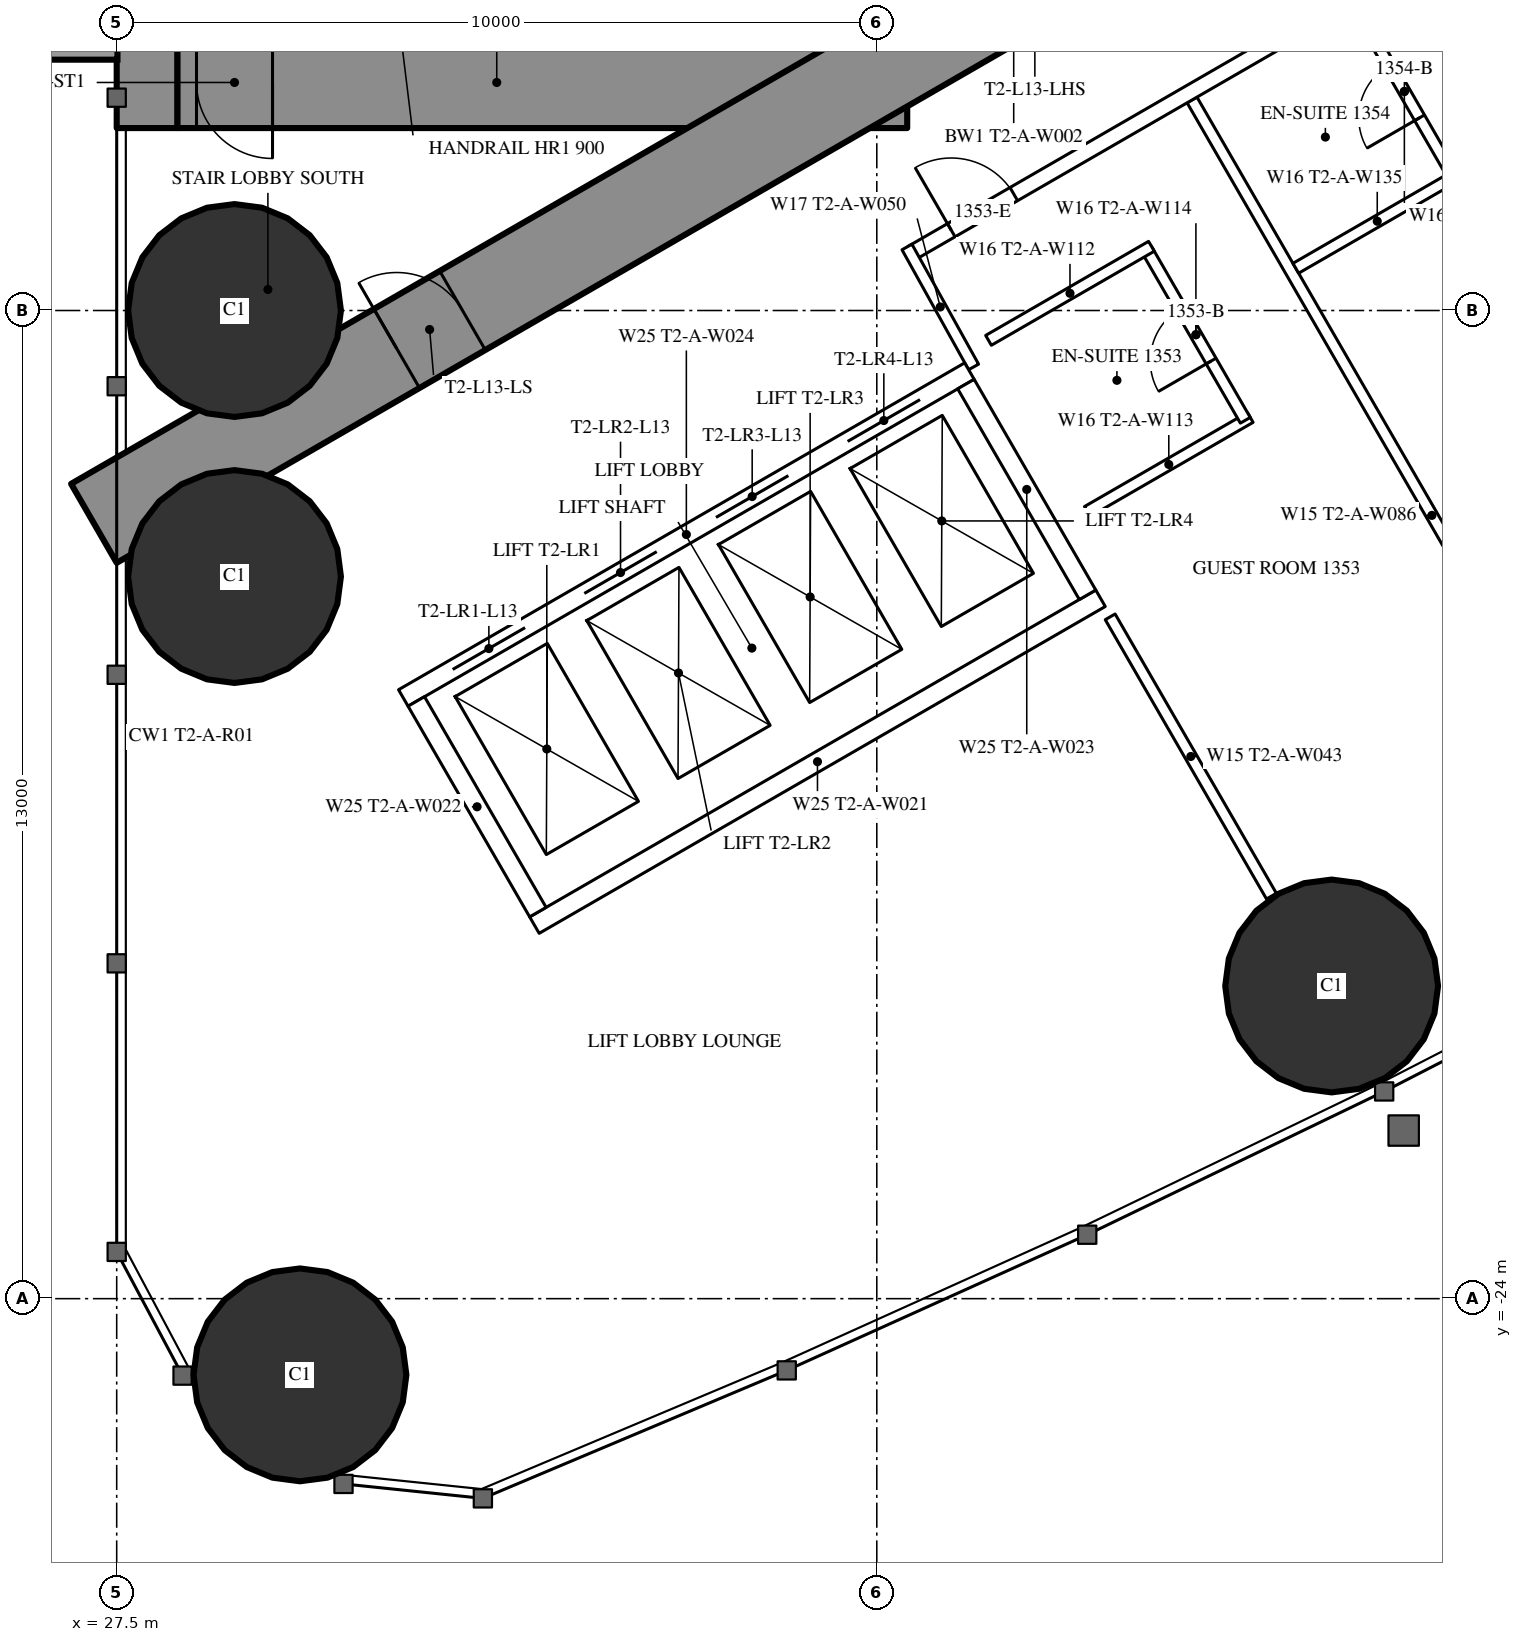
"""IFC4 building model, lengths in metres.
Left out: names, types, materials, properties, quantities, classifications, styles, units other than length and angle.
Written with IfcOpenShell. Run it as: python <this file> out.ifc"""

import sys

from ifc_helpers import new_model, si_unit, direction, frame, frame_2d, origin, origin_2d, place, context, subcontext, project, spatial, rectangle, hollow_circle, extrude, element, fill, save


model = new_model("IFC4")
c1 = context("Model", 3, precision=1e-05, world=origin(), true_north=direction((0.0, 1.0)))
c2 = subcontext(c1, "Body", "Model", "MODEL_VIEW")
j1 = project(units=[si_unit("LENGTHUNIT", "METRE"), si_unit("PLANEANGLEUNIT", "RADIAN")], contexts=[c1])
p1 = place(None, origin())
s1 = spatial("IfcSite", under=j1, at=p1, CompositionType="ELEMENT")
p2 = place(p1, origin())
s2 = spatial("IfcBuilding", under=s1, at=p2, CompositionType="ELEMENT")
p3 = place(p2, frame((0.0, 0.0, 53.0)))
s3 = spatial("IfcBuildingStorey", under=s2, at=p3, CompositionType="ELEMENT", Elevation=53.0)
for number, where, z_axis, x_axis in (
    (1, (29.911, -25.002, 0.0), (0.0, 0.0, 1.0), (1.0, 0.0, 0.0)),
    (2, (29.05, -11.0, 0.0), (0.0, 0.0, 1.0), (1.0, 0.0, 0.0)),
    (3, (29.05, -14.5, 0.0), (0.0, 0.0, 1.0), (1.0, 0.0, 0.0)),
    (4, (43.484, -19.886, 0.0), (0.0, 0.0, 1.0), (1.0, 0.0, 0.0)),
):
    element("IfcColumn", number, at=place(p3, frame(where, z_axis=z_axis, x_axis=x_axis)), inside=s3, PredefinedType="COLUMN", context=c2, shape_type="SweptSolid", body=[
        extrude(hollow_circle(Radius=1.4, WallThickness=0.12, at=origin_2d()), origin(), (0.0, 0.0, 1.0), 3.5),
    ])
p4 = place(p3, frame((27.9, -8.6, 0.0), z_axis=(0.0, 0.0, 1.0), x_axis=(0.0, 1.0, 0.0)))
e5 = element("IfcWall", 5, at=p4, inside=s3, PredefinedType="SHEAR", context=c2, shape_type="SweptSolid", body=[
    extrude(rectangle(XDim=17.2, YDim=0.8, at=frame_2d((8.6, 0.0))), origin(), (0.0, 0.0, 1.0), 3.5),
])
p5 = place(p4, frame((2.45, 0.0, 0.6)))
e6 = element("IfcOpeningElement", 6, at=p5, cuts=e5, PredefinedType="OPENING", context=c2, shape_type="SweptSolid", body=[
    extrude(rectangle(XDim=0.6, YDim=2.1, at=frame_2d((0.3, 1.05))), frame((0.0, 0.41, 0.0), z_axis=(0.0, -1.0, 0.0), x_axis=(1.0, 0.0, 0.0)), (0.0, 0.0, 1.0), 0.82),
])
p6 = place(p4, frame((14.15, 0.0, 0.6)))
e7 = element("IfcOpeningElement", 7, at=p6, cuts=e5, PredefinedType="OPENING", context=c2, shape_type="SweptSolid", body=[
    extrude(rectangle(XDim=0.6, YDim=2.1, at=frame_2d((0.3, 1.05))), frame((0.0, 0.41, 0.0), z_axis=(0.0, -1.0, 0.0), x_axis=(1.0, 0.0, 0.0)), (0.0, 0.0, 1.0), 0.82),
])
p7 = place(p3, frame((37.3, -8.6, 0.0), z_axis=(0.0, 0.0, 1.0), x_axis=(0.0, 1.0, 0.0)))
e8 = element("IfcWall", 8, at=p7, inside=s3, PredefinedType="SHEAR", context=c2, shape_type="SweptSolid", body=[
    extrude(rectangle(XDim=17.2, YDim=1.2, at=frame_2d((8.6, 0.0))), origin(), (0.0, 0.0, 1.0), 3.5),
])
p8 = place(p7, frame((7.7, 0.0, 0.0)))
e9 = element("IfcOpeningElement", 9, at=p8, cuts=e8, PredefinedType="OPENING", context=c2, shape_type="SweptSolid", body=[
    extrude(rectangle(XDim=1.8, YDim=2.2, at=frame_2d((0.9, 1.1))), frame((0.0, 0.61, 0.0), z_axis=(0.0, -1.0, 0.0), x_axis=(1.0, 0.0, 0.0)), (0.0, 0.0, 1.0), 1.22),
])
p9 = place(p3, frame((28.3, -8.0, 0.0), z_axis=(0.0, 0.0, 1.0), x_axis=(1.0, 0.0, 0.0)))
e10 = element("IfcWall", 10, at=p9, inside=s3, PredefinedType="SHEAR", context=c2, shape_type="SweptSolid", body=[
    extrude(rectangle(XDim=8.4, YDim=1.2, at=frame_2d((4.2, 0.0))), origin(), (0.0, 0.0, 1.0), 3.5),
])
p10 = place(p9, frame((0.25, 0.0, 0.0)))
e11 = element("IfcOpeningElement", 11, at=p10, cuts=e10, PredefinedType="OPENING", context=c2, shape_type="SweptSolid", body=[
    extrude(rectangle(XDim=1.0, YDim=2.2, at=frame_2d((0.5, 1.1))), frame((0.0, 0.61, 0.0), z_axis=(0.0, -1.0, 0.0), x_axis=(1.0, 0.0, 0.0)), (0.0, 0.0, 1.0), 1.22),
])
p11 = place(p3, frame((27.2, -13.8, 0.0), z_axis=(0.0, 0.0, 1.0), x_axis=(0.866027159892, 0.499996958321, 0.0)))
e12 = element("IfcWall", 12, at=p11, inside=s3, PredefinedType="SHEAR", context=c2, shape_type="SweptSolid", body=[
    extrude(rectangle(XDim=27.947, YDim=1.2, at=frame_2d((13.973, 0.0))), origin(), (0.0, 0.0, 1.0), 3.5),
])
p12 = place(p11, frame((4.6, 0.0, 0.0)))
e13 = element("IfcOpeningElement", 13, at=p12, cuts=e12, PredefinedType="OPENING", context=c2, shape_type="SweptSolid", body=[
    extrude(rectangle(XDim=1.0, YDim=2.2, at=frame_2d((0.5, 1.1))), frame((0.0, 0.61, 0.0), z_axis=(0.0, -1.0, 0.0), x_axis=(1.0, 0.0, 0.0)), (0.0, 0.0, 1.0), 1.22),
])
p13 = place(p11, frame((13.395, 0.0, 0.0)))
e14 = element("IfcOpeningElement", 14, at=p13, cuts=e12, PredefinedType="OPENING", context=c2, shape_type="SweptSolid", body=[
    extrude(rectangle(XDim=1.8, YDim=2.2, at=frame_2d((0.9, 1.1))), frame((0.0, 0.61, 0.0), z_axis=(0.0, -1.0, 0.0), x_axis=(1.0, 0.0, 0.0)), (0.0, 0.0, 1.0), 1.22),
])
p14 = place(p3, frame((41.647, -8.23, 0.0), z_axis=(0.0, 0.0, 1.0), x_axis=(0.49998590462, -0.866033541603, 0.0)))
e15 = element("IfcWall", 15, at=p14, inside=s3, PredefinedType="PARTITIONING", context=c2, shape_type="SweptSolid", body=[
    extrude(rectangle(XDim=12.621, YDim=0.15, at=frame_2d((6.311, 0.0))), origin(), (0.0, 0.0, 1.0), 3.25),
])
p15 = place(p3, frame((40.57, -15.03, 0.0), z_axis=(0.0, 0.0, 1.0), x_axis=(0.500012993597, -0.866017901798, 0.0)))
e16 = element("IfcWall", 16, at=p15, inside=s3, PredefinedType="PARTITIONING", context=c2, shape_type="SweptSolid", body=[
    extrude(rectangle(XDim=4.243, YDim=0.15, at=frame_2d((2.122, 0.0))), origin(), (0.0, 0.0, 1.0), 3.25),
])
p16 = place(p3, frame((37.96, -10.243, 0.0), z_axis=(0.0, 0.0, 1.0), x_axis=(0.866026429433, 0.499998223521, 0.0)))
e17 = element("IfcWall", 17, at=p16, inside=s3, PredefinedType="PARTITIONING", context=c2, shape_type="SweptSolid", body=[
    extrude(rectangle(XDim=20.487, YDim=0.2, at=frame_2d((10.243, 0.0))), origin(), (0.0, 0.0, 1.0), 3.25),
])
p17 = place(p16, frame((6.925, 0.0, 0.0)))
e18 = element("IfcOpeningElement", 18, at=p17, cuts=e17, PredefinedType="OPENING", context=c2, shape_type="SweptSolid", body=[
    extrude(rectangle(XDim=0.95, YDim=2.2, at=frame_2d((0.475, 1.1))), frame((0.0, 0.11, 0.0), z_axis=(0.0, -1.0, 0.0), x_axis=(1.0, 0.0, 0.0)), (0.0, 0.0, 1.0), 0.22),
])
p18 = place(p16, frame((11.549, 0.0, 0.0)))
e19 = element("IfcOpeningElement", 19, at=p18, cuts=e17, PredefinedType="OPENING", context=c2, shape_type="SweptSolid", body=[
    extrude(rectangle(XDim=0.95, YDim=2.2, at=frame_2d((0.475, 1.1))), frame((0.0, 0.11, 0.0), z_axis=(0.0, -1.0, 0.0), x_axis=(1.0, 0.0, 0.0)), (0.0, 0.0, 1.0), 0.22),
])
p19 = place(p16, frame((13.249, 0.0, 0.0)))
e20 = element("IfcOpeningElement", 20, at=p19, cuts=e17, PredefinedType="OPENING", context=c2, shape_type="SweptSolid", body=[
    extrude(rectangle(XDim=0.95, YDim=2.2, at=frame_2d((0.475, 1.1))), frame((0.0, 0.11, 0.0), z_axis=(0.0, -1.0, 0.0), x_axis=(1.0, 0.0, 0.0)), (0.0, 0.0, 1.0), 0.22),
])
p20 = place(p16, frame((17.585, 0.0, 0.0)))
e21 = element("IfcOpeningElement", 21, at=p20, cuts=e17, PredefinedType="OPENING", context=c2, shape_type="SweptSolid", body=[
    extrude(rectangle(XDim=0.95, YDim=2.2, at=frame_2d((0.475, 1.1))), frame((0.0, 0.11, 0.0), z_axis=(0.0, -1.0, 0.0), x_axis=(1.0, 0.0, 0.0)), (0.0, 0.0, 1.0), 0.22),
])
p21 = place(p16, frame((0.6, 0.0, 0.0)))
e22 = element("IfcOpeningElement", 22, at=p21, cuts=e17, PredefinedType="OPENING", context=c2, shape_type="SweptSolid", body=[
    extrude(rectangle(XDim=0.95, YDim=2.2, at=frame_2d((0.475, 1.1))), frame((0.0, 0.11, 0.0), z_axis=(0.0, -1.0, 0.0), x_axis=(1.0, 0.0, 0.0)), (0.0, 0.0, 1.0), 0.22),
])
p22 = place(p3, frame((38.773, -11.742, 0.0), z_axis=(0.0, 0.0, 1.0), x_axis=(-0.485528096672, 0.8742210632, 0.0)))
e23 = element("IfcWall", 23, at=p22, inside=s3, PredefinedType="PARTITIONING", context=c2, shape_type="SweptSolid", body=[
    extrude(rectangle(XDim=1.805, YDim=0.15, at=frame_2d((0.903, 0.0))), origin(), (0.0, 0.0, 1.0), 3.25),
])
p23 = place(p3, frame((43.012, -10.444, 0.0), z_axis=(0.0, 0.0, 1.0), x_axis=(0.866031185235, 0.4999899861, 0.0)))
e24 = element("IfcWall", 24, at=p23, inside=s3, PredefinedType="PARTITIONING", context=c2, shape_type="SweptSolid", body=[
    extrude(rectangle(XDim=2.475, YDim=0.15, at=frame_2d((1.238, 0.0))), origin(), (0.0, 0.0, 1.0), 3.25),
])
p24 = place(p3, frame((43.791, -6.993, 0.0), z_axis=(0.0, 0.0, 1.0), x_axis=(0.500047596559, -0.865997922154, 0.0)))
e25 = element("IfcWall", 25, at=p24, inside=s3, PredefinedType="PARTITIONING", context=c2, shape_type="SweptSolid", body=[
    extrude(rectangle(XDim=2.6, YDim=0.15, at=frame_2d((1.3, 0.0))), origin(), (0.0, 0.0, 1.0), 3.25),
])
p25 = place(p24, frame((0.9, 0.0, 0.0)))
e26 = element("IfcOpeningElement", 26, at=p25, cuts=e25, PredefinedType="OPENING", context=c2, shape_type="SweptSolid", body=[
    extrude(rectangle(XDim=0.8, YDim=2.2, at=frame_2d((0.4, 1.1))), frame((0.0, 0.085, 0.0), z_axis=(0.0, -1.0, 0.0), x_axis=(1.0, 0.0, 0.0)), (0.0, 0.0, 1.0), 0.17),
])
p26 = place(p3, frame((40.27, -13.644, 0.0), z_axis=(0.0, 0.0, 1.0), x_axis=(0.866031185235, 0.4999899861, 0.0)))
e27 = element("IfcWall", 27, at=p26, inside=s3, PredefinedType="PARTITIONING", context=c2, shape_type="SweptSolid", body=[
    extrude(rectangle(XDim=2.475, YDim=0.15, at=frame_2d((1.238, 0.0))), origin(), (0.0, 0.0, 1.0), 3.25),
])
p27 = place(p3, frame((41.048, -10.193, 0.0), z_axis=(0.0, 0.0, 1.0), x_axis=(0.500047596559, -0.865997922154, 0.0)))
e28 = element("IfcWall", 28, at=p27, inside=s3, PredefinedType="PARTITIONING", context=c2, shape_type="SweptSolid", body=[
    extrude(rectangle(XDim=2.6, YDim=0.15, at=frame_2d((1.3, 0.0))), origin(), (0.0, 0.0, 1.0), 3.25),
])
p28 = place(p27, frame((0.9, 0.0, 0.0)))
e29 = element("IfcOpeningElement", 29, at=p28, cuts=e28, PredefinedType="OPENING", context=c2, shape_type="SweptSolid", body=[
    extrude(rectangle(XDim=0.8, YDim=2.2, at=frame_2d((0.4, 1.1))), frame((0.0, 0.085, 0.0), z_axis=(0.0, -1.0, 0.0), x_axis=(1.0, 0.0, 0.0)), (0.0, 0.0, 1.0), 0.17),
])
p29 = place(p3, frame((38.97, -11.393, 0.0), z_axis=(0.0, 0.0, 1.0), x_axis=(0.866031185235, 0.4999899861, 0.0)))
e30 = element("IfcWall", 30, at=p29, inside=s3, PredefinedType="PARTITIONING", context=c2, shape_type="SweptSolid", body=[
    extrude(rectangle(XDim=2.475, YDim=0.15, at=frame_2d((1.238, 0.0))), origin(), (0.0, 0.0, 1.0), 3.25),
])
p30 = place(p3, frame((31.271, -16.097, 0.0), z_axis=(0.0, 0.0, 1.0), x_axis=(0.86604045752, 0.499973925258, 0.0)))
e31 = element("IfcWall", 31, at=p30, inside=s3, PredefinedType="PARTITIONING", context=c2, shape_type="SweptSolid", body=[
    extrude(rectangle(XDim=8.6, YDim=0.25, at=frame_2d((4.3, 0.0))), origin(), (0.0, 0.0, 1.0), 3.25),
])
p31 = place(p30, frame((0.75, 0.0, 0.0)))
e32 = element("IfcOpeningElement", 32, at=p31, cuts=e31, PredefinedType="OPENING", context=c2, shape_type="SweptSolid", body=[
    extrude(rectangle(XDim=1.1, YDim=2.2, at=frame_2d((0.55, 1.1))), frame((0.0, 0.135, 0.0), z_axis=(0.0, -1.0, 0.0), x_axis=(1.0, 0.0, 0.0)), (0.0, 0.0, 1.0), 0.27),
])
p32 = place(p30, frame((2.75, 0.0, 0.0)))
e33 = element("IfcOpeningElement", 33, at=p32, cuts=e31, PredefinedType="OPENING", context=c2, shape_type="SweptSolid", body=[
    extrude(rectangle(XDim=1.1, YDim=2.2, at=frame_2d((0.55, 1.1))), frame((0.0, 0.135, 0.0), z_axis=(0.0, -1.0, 0.0), x_axis=(1.0, 0.0, 0.0)), (0.0, 0.0, 1.0), 0.27),
])
p33 = place(p30, frame((4.75, 0.0, 0.0)))
e34 = element("IfcOpeningElement", 34, at=p33, cuts=e31, PredefinedType="OPENING", context=c2, shape_type="SweptSolid", body=[
    extrude(rectangle(XDim=1.1, YDim=2.2, at=frame_2d((0.55, 1.1))), frame((0.0, 0.135, 0.0), z_axis=(0.0, -1.0, 0.0), x_axis=(1.0, 0.0, 0.0)), (0.0, 0.0, 1.0), 0.27),
])
p34 = place(p30, frame((6.75, 0.0, 0.0)))
e35 = element("IfcOpeningElement", 35, at=p34, cuts=e31, PredefinedType="OPENING", context=c2, shape_type="SweptSolid", body=[
    extrude(rectangle(XDim=1.1, YDim=2.2, at=frame_2d((0.55, 1.1))), frame((0.0, 0.135, 0.0), z_axis=(0.0, -1.0, 0.0), x_axis=(1.0, 0.0, 0.0)), (0.0, 0.0, 1.0), 0.27),
])
p35 = place(p3, frame((32.996, -19.086, 0.0), z_axis=(0.0, 0.0, 1.0), x_axis=(0.866028165386, 0.499995216735, 0.0)))
e36 = element("IfcWall", 36, at=p35, inside=s3, PredefinedType="PARTITIONING", context=c2, shape_type="SweptSolid", body=[
    extrude(rectangle(XDim=8.6, YDim=0.25, at=frame_2d((4.3, 0.0))), origin(), (0.0, 0.0, 1.0), 3.25),
])
for number, where, z_axis, x_axis in (
    (37, (31.441, -16.143, 0.0), (0.0, 0.0, 1.0), (0.5, -0.866, 0.0)),
    (38, (38.673, -11.968, 0.0), (0.0, 0.0, 1.0), (0.5, -0.866, 0.0)),
):
    element("IfcWall", number, at=place(p3, frame(where, z_axis=z_axis, x_axis=x_axis)), inside=s3, PredefinedType="PARTITIONING", context=c2, shape_type="SweptSolid", body=[
        extrude(rectangle(XDim=3.201, YDim=0.25, at=frame_2d((1.6, 0.0))), origin(), (0.0, 0.0, 1.0), 3.25),
    ])
p36 = place(p25, origin())
e39 = element("IfcDoor", 39, at=p36, inside=s3, OperationType="SINGLE_SWING_RIGHT", PredefinedType="DOOR", context=c2, shape_type="SweptSolid", body=[
    extrude(rectangle(XDim=0.8, YDim=2.2, at=frame_2d((0.4, 1.1))), frame((0.0, 0.025, 0.0), z_axis=(0.0, -1.0, 0.0), x_axis=(1.0, 0.0, 0.0)), (0.0, 0.0, 1.0), 0.05),
])
fill(e26, e39)
p37 = place(p28, origin())
e40 = element("IfcDoor", 40, at=p37, inside=s3, OperationType="SINGLE_SWING_RIGHT", PredefinedType="DOOR", context=c2, shape_type="SweptSolid", body=[
    extrude(rectangle(XDim=0.8, YDim=2.2, at=frame_2d((0.4, 1.1))), frame((0.0, 0.025, 0.0), z_axis=(0.0, -1.0, 0.0), x_axis=(1.0, 0.0, 0.0)), (0.0, 0.0, 1.0), 0.05),
])
fill(e29, e40)
p38 = place(p21, origin())
e41 = element("IfcDoor", 41, at=p38, inside=s3, OperationType="SINGLE_SWING_LEFT", PredefinedType="DOOR", context=c2, shape_type="SweptSolid", body=[
    extrude(rectangle(XDim=0.95, YDim=2.2, at=frame_2d((0.475, 1.1))), frame((0.0, 0.025, 0.0), z_axis=(0.0, -1.0, 0.0), x_axis=(1.0, 0.0, 0.0)), (0.0, 0.0, 1.0), 0.05),
])
fill(e22, e41)
p39 = place(p12, origin())
e42 = element("IfcDoor", 42, at=p39, inside=s3, OperationType="SINGLE_SWING_LEFT", PredefinedType="DOOR", context=c2, shape_type="SweptSolid", body=[
    extrude(rectangle(XDim=1.0, YDim=2.2, at=frame_2d((0.5, 1.1))), frame((0.0, 0.025, 0.0), z_axis=(0.0, -1.0, 0.0), x_axis=(1.0, 0.0, 0.0)), (0.0, 0.0, 1.0), 0.05),
])
fill(e13, e42)
p40 = place(p10, origin())
e43 = element("IfcDoor", 43, at=p40, inside=s3, OperationType="SINGLE_SWING_RIGHT", PredefinedType="DOOR", context=c2, shape_type="SweptSolid", body=[
    extrude(rectangle(XDim=1.0, YDim=2.2, at=frame_2d((0.5, 1.1))), frame((0.0, 0.025, 0.0), z_axis=(0.0, -1.0, 0.0), x_axis=(1.0, 0.0, 0.0)), (0.0, 0.0, 1.0), 0.05),
])
fill(e11, e43)
p41 = place(p31, origin())
e44 = element("IfcDoor", 44, at=p41, inside=s3, OperationType="DOUBLE_DOOR_SLIDING", PredefinedType="USERDEFINED", context=c2, shape_type="SweptSolid", body=[
    extrude(rectangle(XDim=1.1, YDim=2.2, at=frame_2d((0.55, 1.1))), frame((0.0, 0.025, 0.0), z_axis=(0.0, -1.0, 0.0), x_axis=(1.0, 0.0, 0.0)), (0.0, 0.0, 1.0), 0.05),
])
fill(e32, e44)
p42 = place(p32, origin())
e45 = element("IfcDoor", 45, at=p42, inside=s3, OperationType="DOUBLE_DOOR_SLIDING", PredefinedType="USERDEFINED", context=c2, shape_type="SweptSolid", body=[
    extrude(rectangle(XDim=1.1, YDim=2.2, at=frame_2d((0.55, 1.1))), frame((0.0, 0.025, 0.0), z_axis=(0.0, -1.0, 0.0), x_axis=(1.0, 0.0, 0.0)), (0.0, 0.0, 1.0), 0.05),
])
fill(e33, e45)
p43 = place(p33, origin())
e46 = element("IfcDoor", 46, at=p43, inside=s3, OperationType="DOUBLE_DOOR_SLIDING", PredefinedType="USERDEFINED", context=c2, shape_type="SweptSolid", body=[
    extrude(rectangle(XDim=1.1, YDim=2.2, at=frame_2d((0.55, 1.1))), frame((0.0, 0.025, 0.0), z_axis=(0.0, -1.0, 0.0), x_axis=(1.0, 0.0, 0.0)), (0.0, 0.0, 1.0), 0.05),
])
fill(e34, e46)
p44 = place(p34, origin())
e47 = element("IfcDoor", 47, at=p44, inside=s3, OperationType="DOUBLE_DOOR_SLIDING", PredefinedType="USERDEFINED", context=c2, shape_type="SweptSolid", body=[
    extrude(rectangle(XDim=1.1, YDim=2.2, at=frame_2d((0.55, 1.1))), frame((0.0, 0.025, 0.0), z_axis=(0.0, -1.0, 0.0), x_axis=(1.0, 0.0, 0.0)), (0.0, 0.0, 1.0), 0.05),
])
fill(e35, e47)
save(model, sys.argv[1])
